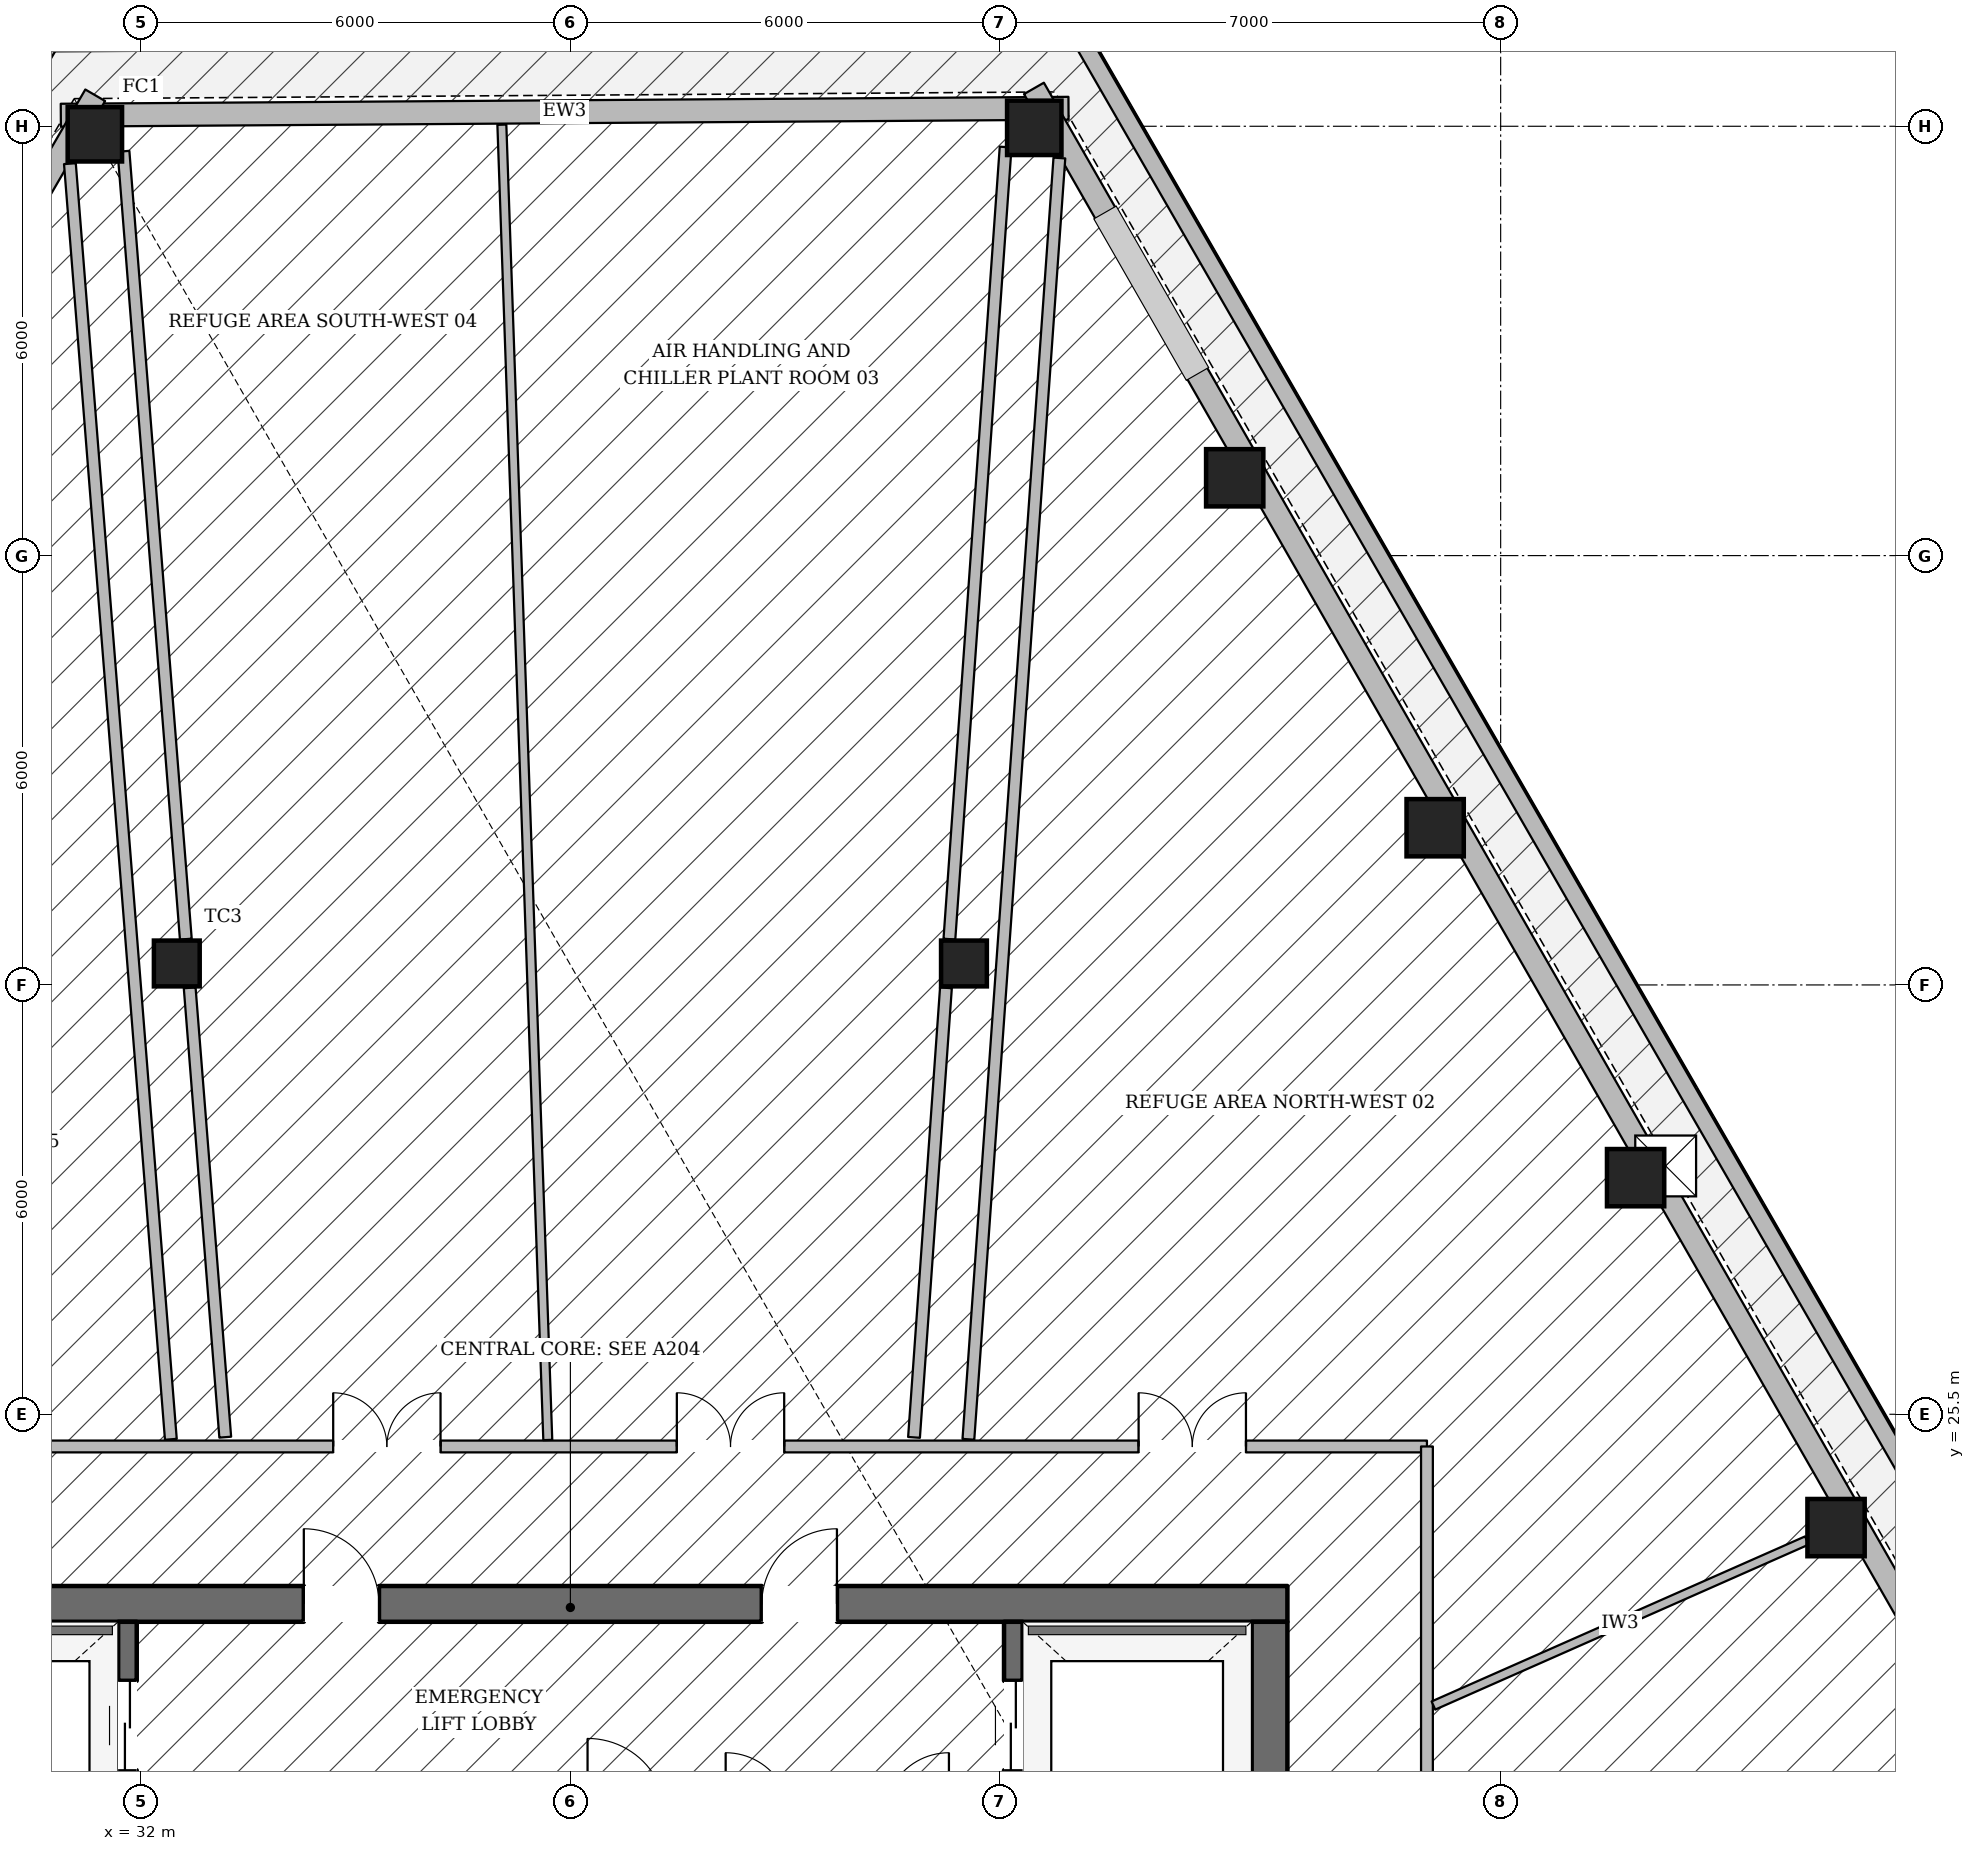
"""IFC4 building model, lengths in metres.
Left out: names, types, materials, properties, quantities, classifications, styles, units other than length and angle.
Written with IfcOpenShell. Run it as: python <this file> out.ifc"""

import sys

from ifc_helpers import new_model, si_unit, direction, frame, frame_2d, origin, origin_2d, place, context, subcontext, project, spatial, rectangle, hollow_rectangle, extrude, element, fill, save


model = new_model("IFC4")
c1 = context("Model", 3, precision=1e-05, world=origin(), true_north=direction((0.0, 1.0)))
c2 = subcontext(c1, "Body", "Model", "MODEL_VIEW")
j1 = project(units=[si_unit("LENGTHUNIT", "METRE"), si_unit("PLANEANGLEUNIT", "RADIAN")], contexts=[c1])
p1 = place(None, origin())
s1 = spatial("IfcSite", under=j1, at=p1, CompositionType="ELEMENT")
p2 = place(p1, origin())
s2 = spatial("IfcBuilding", under=s1, at=p2, CompositionType="ELEMENT")
p3 = place(p2, frame((0.0, 0.0, 75.3)))
s3 = spatial("IfcBuildingStorey", under=s2, at=p3, CompositionType="ELEMENT", Elevation=75.3)
p4 = place(p3, frame((27.98, 22.85, 0.0), z_axis=(0.0, 0.0, 1.0), x_axis=(1.0, 0.0, 0.0)))
e1 = element("IfcWall", 1, at=p4, inside=s3, PredefinedType="SOLIDWALL", context=c2, shape_type="SweptSolid", body=[
    extrude(rectangle(XDim=20.04, YDim=0.5, at=frame_2d((10.02, 0.0))), origin(), (0.0, 0.0, 1.0), 4.985),
])
p5 = place(p4, frame((6.295, 0.0, 0.0)))
e2 = element("IfcOpeningElement", 2, at=p5, cuts=e1, PredefinedType="OPENING", context=c2, shape_type="SweptSolid", body=[
    extrude(rectangle(XDim=1.05, YDim=2.15, at=frame_2d((0.525, 1.075))), frame((0.0, 0.26, 0.0), z_axis=(0.0, -1.0, 0.0), x_axis=(1.0, 0.0, 0.0)), (0.0, 0.0, 1.0), 0.52),
])
p6 = place(p4, frame((12.695, 0.0, 0.0)))
e3 = element("IfcOpeningElement", 3, at=p6, cuts=e1, PredefinedType="OPENING", context=c2, shape_type="SweptSolid", body=[
    extrude(rectangle(XDim=1.05, YDim=2.15, at=frame_2d((0.525, 1.075))), frame((0.0, 0.26, 0.0), z_axis=(0.0, -1.0, 0.0), x_axis=(1.0, 0.0, 0.0)), (0.0, 0.0, 1.0), 0.52),
])
p7 = place(p3, frame((47.77, 9.6, 0.0), z_axis=(0.0, 0.0, 1.0), x_axis=(0.0, 1.0, 0.0)))
e4 = element("IfcWall", 4, at=p7, inside=s3, PredefinedType="SOLIDWALL", context=c2, shape_type="SweptSolid", body=[
    extrude(rectangle(XDim=13.0, YDim=0.5, at=frame_2d((6.5, 0.0))), origin(), (0.0, 0.0, 1.0), 4.985),
])
p8 = place(p7, frame((0.2, 0.0, 0.0)))
e5 = element("IfcOpeningElement", 5, at=p8, cuts=e4, PredefinedType="OPENING", context=c2, shape_type="SweptSolid", body=[
    extrude(rectangle(XDim=1.1, YDim=2.15, at=frame_2d((0.55, 1.075))), frame((0.0, 0.26, 0.0), z_axis=(0.0, -1.0, 0.0), x_axis=(1.0, 0.0, 0.0)), (0.0, 0.0, 1.0), 0.52),
])
p9 = place(p7, frame((8.4, 0.0, 0.0)))
e6 = element("IfcOpeningElement", 6, at=p9, cuts=e4, PredefinedType="OPENING", context=c2, shape_type="SweptSolid", body=[
    extrude(rectangle(XDim=0.9, YDim=2.1, at=frame_2d((0.45, 1.05))), frame((0.0, 0.26, 0.0), z_axis=(0.0, -1.0, 0.0), x_axis=(1.0, 0.0, 0.0)), (0.0, 0.0, 1.0), 0.52),
])
p10 = place(p3, frame((31.81, 9.6, 0.0), z_axis=(0.0, 0.0, 1.0), x_axis=(0.0, 1.0, 0.0)))
e7 = element("IfcWall", 7, at=p10, inside=s3, PredefinedType="SHEAR", context=c2, shape_type="SweptSolid", body=[
    extrude(rectangle(XDim=13.0, YDim=0.26, at=frame_2d((6.5, 0.0))), origin(), (0.0, 0.0, 1.0), 4.985),
])
p11 = place(p10, frame((10.925, 0.0, 0.0)))
e8 = element("IfcOpeningElement", 8, at=p11, cuts=e7, PredefinedType="OPENING", context=c2, shape_type="SweptSolid", body=[
    extrude(rectangle(XDim=1.25, YDim=2.25, at=frame_2d((0.625, 1.125))), frame((0.0, 0.14, 0.0), z_axis=(0.0, -1.0, 0.0), x_axis=(1.0, 0.0, 0.0)), (0.0, 0.0, 1.0), 0.28),
])
p12 = place(p3, frame((44.19, 9.6, 0.0), z_axis=(0.0, 0.0, 1.0), x_axis=(0.0, 1.0, 0.0)))
e9 = element("IfcWall", 9, at=p12, inside=s3, PredefinedType="SHEAR", context=c2, shape_type="SweptSolid", body=[
    extrude(rectangle(XDim=13.0, YDim=0.26, at=frame_2d((6.5, 0.0))), origin(), (0.0, 0.0, 1.0), 4.985),
])
p13 = place(p12, frame((10.925, 0.0, 0.0)))
e10 = element("IfcOpeningElement", 10, at=p13, cuts=e9, PredefinedType="OPENING", context=c2, shape_type="SweptSolid", body=[
    extrude(rectangle(XDim=1.25, YDim=2.25, at=frame_2d((0.625, 1.125))), frame((0.0, 0.14, 0.0), z_axis=(0.0, -1.0, 0.0), x_axis=(1.0, 0.0, 0.0)), (0.0, 0.0, 1.0), 0.28),
])
p14 = place(p3, frame((31.355, 43.388, 0.0), z_axis=(0.0, 0.0, 1.0), x_axis=(1.0, 0.0, 0.0)))
e11 = element("IfcColumn", 11, at=p14, inside=s3, PredefinedType="COLUMN", context=c2, shape_type="SweptSolid", body=[
    extrude(hollow_rectangle(XDim=0.76, YDim=0.76, WallThickness=0.035, at=origin_2d()), origin(), (0.0, 0.0, 1.0), 4.985),
])
for number, where, z_axis, x_axis in (
    (12, (55.687, 23.916, 0.0), (0.0, 0.0, 1.0), (1.0, 0.0, 0.0)),
    (13, (52.886, 28.807, 0.0), (0.0, 0.0, 1.0), (1.0, 0.0, 0.0)),
    (14, (50.085, 33.697, 0.0), (0.0, 0.0, 1.0), (1.0, 0.0, 0.0)),
    (15, (47.284, 38.588, 0.0), (0.0, 0.0, 1.0), (1.0, 0.0, 0.0)),
):
    element("IfcColumn", number, at=place(p3, frame(where, z_axis=z_axis, x_axis=x_axis)), inside=s3, PredefinedType="COLUMN", context=c2, shape_type="SweptSolid", body=[
        extrude(hollow_rectangle(XDim=0.8, YDim=0.8, WallThickness=0.036, at=origin_2d()), origin(), (0.0, 0.0, 1.0), 4.985),
    ])
p15 = place(p3, frame((44.482, 43.478, 0.0), z_axis=(0.0, 0.0, 1.0), x_axis=(1.0, 0.0, 0.0)))
e16 = element("IfcColumn", 16, at=p15, inside=s3, PredefinedType="COLUMN", context=c2, shape_type="SweptSolid", body=[
    extrude(hollow_rectangle(XDim=0.76, YDim=0.76, WallThickness=0.035, at=origin_2d()), origin(), (0.0, 0.0, 1.0), 4.985),
])
for number, where, z_axis, x_axis in (
    (17, (32.5, 31.8, 0.0), (0.0, 0.0, 1.0), (1.0, 0.0, 0.0)),
    (18, (43.5, 31.8, 0.0), (0.0, 0.0, 1.0), (1.0, 0.0, 0.0)),
):
    element("IfcColumn", number, at=place(p3, frame(where, z_axis=z_axis, x_axis=x_axis)), inside=s3, PredefinedType="COLUMN", context=c2, shape_type="SweptSolid", body=[
        extrude(hollow_rectangle(XDim=0.64, YDim=0.64, WallThickness=0.028, at=origin_2d()), origin(), (0.0, 0.0, 1.0), 4.985),
    ])
p16 = place(p3, frame((30.879, 43.655, 0.0), z_axis=(0.0, 0.0, 1.0), x_axis=(0.999976431896, 0.006865540883, 0.0)))
e19 = element("IfcWall", 19, at=p16, inside=s3, PredefinedType="STANDARD", context=c2, shape_type="SweptSolid", body=[
    extrude(rectangle(XDim=14.082, YDim=0.32, at=frame_2d((7.041, 0.0))), origin(), (0.0, 0.0, 1.0), 3.677),
])
p17 = place(p3, frame((13.665, 13.524, 0.0), z_axis=(0.0, 0.0, 1.0), x_axis=(0.50295003743, 0.864315486295, 0.0)))
e20 = element("IfcWall", 20, at=p17, inside=s3, PredefinedType="STANDARD", context=c2, shape_type="SweptSolid", body=[
    extrude(rectangle(XDim=35.184, YDim=0.32, at=frame_2d((17.592, 0.0))), origin(), (0.0, 0.0, 1.0), 3.677),
])
p18 = place(p3, frame((44.478, 44.029, 0.0), z_axis=(0.0, 0.0, 1.0), x_axis=(0.497006709314, -0.867746697428, 0.0)))
e21 = element("IfcWall", 21, at=p18, inside=s3, PredefinedType="STANDARD", context=c2, shape_type="SweptSolid", body=[
    extrude(rectangle(XDim=34.773, YDim=0.32, at=frame_2d((17.386, 0.0))), origin(), (0.0, 0.0, 1.0), 3.677),
])
p19 = place(p3, frame((30.821, 44.822, 0.0), z_axis=(0.0, 0.0, 1.0), x_axis=(-0.504421897802, -0.863457323218, 0.0)))
e22 = element("IfcWall", 22, at=p19, inside=s3, PredefinedType="PARAPET", context=c2, shape_type="SweptSolid", body=[
    extrude(rectangle(XDim=36.395, YDim=0.24, at=frame_2d((18.197, 0.0))), origin(), (0.0, 0.0, 1.0), 1.25),
])
p20 = place(p3, frame((63.012, 13.699, 0.0), z_axis=(0.0, 0.0, 1.0), x_axis=(-0.499261971682, 0.866451085539, 0.0)))
e23 = element("IfcWall", 23, at=p20, inside=s3, PredefinedType="PARAPET", context=c2, shape_type="SweptSolid", body=[
    extrude(rectangle(XDim=36.021, YDim=0.24, at=frame_2d((18.01, 0.0))), origin(), (0.0, 0.0, 1.0), 1.25),
])
p21 = place(p3, frame((26.03, 25.05, 0.0), z_axis=(0.0, 0.0, 1.0), x_axis=(1.0, 0.0, 0.0)))
e24 = element("IfcWall", 24, at=p21, inside=s3, PredefinedType="PARTITIONING", context=c2, shape_type="SweptSolid", body=[
    extrude(rectangle(XDim=23.94, YDim=0.165, at=frame_2d((11.97, 0.0))), origin(), (0.0, 0.0, 1.0), 4.985),
])
p22 = place(p21, frame((19.911, 0.0, 0.0)))
e25 = element("IfcOpeningElement", 25, at=p22, cuts=e24, PredefinedType="OPENING", context=c2, shape_type="SweptSolid", body=[
    extrude(rectangle(XDim=1.5, YDim=2.25, at=frame_2d((0.75, 1.125))), frame((0.0, 0.093, 0.0), z_axis=(0.0, -1.0, 0.0), x_axis=(1.0, 0.0, 0.0)), (0.0, 0.0, 1.0), 0.185),
])
p23 = place(p21, frame((13.458, 0.0, 0.0)))
e26 = element("IfcOpeningElement", 26, at=p23, cuts=e24, PredefinedType="OPENING", context=c2, shape_type="SweptSolid", body=[
    extrude(rectangle(XDim=1.5, YDim=2.25, at=frame_2d((0.75, 1.125))), frame((0.0, 0.093, 0.0), z_axis=(0.0, -1.0, 0.0), x_axis=(1.0, 0.0, 0.0)), (0.0, 0.0, 1.0), 0.185),
])
p24 = place(p21, frame((8.656, 0.0, 0.0)))
e27 = element("IfcOpeningElement", 27, at=p24, cuts=e24, PredefinedType="OPENING", context=c2, shape_type="SweptSolid", body=[
    extrude(rectangle(XDim=1.5, YDim=2.25, at=frame_2d((0.75, 1.125))), frame((0.0, 0.093, 0.0), z_axis=(0.0, -1.0, 0.0), x_axis=(1.0, 0.0, 0.0)), (0.0, 0.0, 1.0), 0.185),
])
p25 = place(p3, frame((49.97, 7.15, 0.0), z_axis=(0.0, 0.0, 1.0), x_axis=(0.0, 1.0, 0.0)))
e28 = element("IfcWall", 28, at=p25, inside=s3, PredefinedType="PARTITIONING", context=c2, shape_type="SweptSolid", body=[
    extrude(rectangle(XDim=17.9, YDim=0.165, at=frame_2d((8.95, 0.0))), origin(), (0.0, 0.0, 1.0), 4.673),
])
p26 = place(p25, frame((8.694, 0.0, 0.0)))
e29 = element("IfcOpeningElement", 29, at=p26, cuts=e28, PredefinedType="OPENING", context=c2, shape_type="SweptSolid", body=[
    extrude(rectangle(XDim=1.5, YDim=2.25, at=frame_2d((0.75, 1.125))), frame((0.0, 0.093, 0.0), z_axis=(0.0, -1.0, 0.0), x_axis=(1.0, 0.0, 0.0)), (0.0, 0.0, 1.0), 0.185),
])
p27 = place(p25, frame((1.235, 0.0, 0.0)))
e30 = element("IfcOpeningElement", 30, at=p27, cuts=e28, PredefinedType="OPENING", context=c2, shape_type="SweptSolid", body=[
    extrude(rectangle(XDim=1.5, YDim=2.25, at=frame_2d((0.75, 1.125))), frame((0.0, 0.093, 0.0), z_axis=(0.0, -1.0, 0.0), x_axis=(1.0, 0.0, 0.0)), (0.0, 0.0, 1.0), 0.185),
])
p28 = place(p3, frame((32.417, 25.15, 0.0), z_axis=(0.0, 0.0, 1.0), x_axis=(-0.078880286834, 0.996884095745, 0.0)))
e31 = element("IfcWall", 31, at=p28, inside=s3, PredefinedType="PARTITIONING", context=c2, shape_type="SweptSolid", body=[
    extrude(rectangle(XDim=17.883, YDim=0.165, at=frame_2d((8.942, 0.0))), origin(), (0.0, 0.0, 1.0), 4.985),
])
p29 = place(p3, frame((33.177, 25.18, 0.0), z_axis=(0.0, 0.0, 1.0), x_axis=(-0.078865664547, 0.996885252652, 0.0)))
e32 = element("IfcWall", 32, at=p29, inside=s3, PredefinedType="PARTITIONING", context=c2, shape_type="SweptSolid", body=[
    extrude(rectangle(XDim=6.3, YDim=0.165, at=frame_2d((3.15, 0.0))), origin(), (0.0, 0.0, 1.0), 4.985),
])
p30 = place(p3, frame((32.626, 32.14, 0.0), z_axis=(0.0, 0.0, 1.0), x_axis=(-0.078892101665, 0.996883160804, 0.0)))
e33 = element("IfcWall", 33, at=p30, inside=s3, PredefinedType="PARTITIONING", context=c2, shape_type="SweptSolid", body=[
    extrude(rectangle(XDim=11.045, YDim=0.165, at=frame_2d((5.522, 0.0))), origin(), (0.0, 0.0, 1.0), 4.985),
])
p31 = place(p3, frame((42.802, 25.177, 0.0), z_axis=(0.0, 0.0, 1.0), x_axis=(0.07085314912, 0.997486757436, 0.0)))
e34 = element("IfcWall", 34, at=p31, inside=s3, PredefinedType="PARTITIONING", context=c2, shape_type="SweptSolid", body=[
    extrude(rectangle(XDim=6.299, YDim=0.165, at=frame_2d((3.149, 0.0))), origin(), (0.0, 0.0, 1.0), 4.985),
])
p32 = place(p3, frame((43.296, 32.14, 0.0), z_axis=(0.0, 0.0, 1.0), x_axis=(0.070840543491, 0.997487652755, 0.0)))
e35 = element("IfcWall", 35, at=p32, inside=s3, PredefinedType="PARTITIONING", context=c2, shape_type="SweptSolid", body=[
    extrude(rectangle(XDim=11.097, YDim=0.165, at=frame_2d((5.549, 0.0))), origin(), (0.0, 0.0, 1.0), 4.985),
])
p33 = place(p3, frame((43.562, 25.15, 0.0), z_axis=(0.0, 0.0, 1.0), x_axis=(0.070828551783, 0.997488504321, 0.0)))
e36 = element("IfcWall", 36, at=p33, inside=s3, PredefinedType="PARTITIONING", context=c2, shape_type="SweptSolid", body=[
    extrude(rectangle(XDim=17.952, YDim=0.165, at=frame_2d((8.976, 0.0))), origin(), (0.0, 0.0, 1.0), 4.985),
])
p34 = place(p3, frame((50.061, 21.43, 0.0), z_axis=(0.0, 0.0, 1.0), x_axis=(0.914660112996, 0.404223796545, 0.0)))
e37 = element("IfcWall", 37, at=p34, inside=s3, PredefinedType="PARTITIONING", context=c2, shape_type="SweptSolid", body=[
    extrude(rectangle(XDim=5.705, YDim=0.125, at=frame_2d((2.853, 0.0))), origin(), (0.0, 0.0, 1.0), 3.68),
])
p35 = place(p3, frame((37.684, 25.14, 0.0), z_axis=(0.0, 0.0, 1.0), x_axis=(-0.034896584606, 0.999390928707, 0.0)))
e38 = element("IfcWall", 38, at=p35, inside=s3, PredefinedType="PARTITIONING", context=c2, shape_type="SweptSolid", body=[
    extrude(rectangle(XDim=18.393, YDim=0.125, at=frame_2d((9.196, 0.0))), origin(), (0.0, 0.0, 1.0), 4.985),
])
p36 = place(p3, frame((0.0, 0.0, -0.22)))
p37 = place(p36, frame((53.306, 28.97, 0.0)))
p38 = place(p37, frame((0.0, 0.0, 0.17)))
e39 = element("IfcWindow", 39, at=p38, inside=s3, PartitioningType="SINGLE_PANEL", PredefinedType="SKYLIGHT", context=c2, shape_type="SweptSolid", body=[
    extrude(rectangle(XDim=0.85, YDim=0.85, at=origin_2d()), origin(), (0.0, 0.0, 1.0), 0.05),
])
p39 = place(p5, origin())
e40 = element("IfcDoor", 40, at=p39, inside=s3, OperationType="SINGLE_SWING_LEFT", PredefinedType="DOOR", context=c2, shape_type="SweptSolid", body=[
    extrude(rectangle(XDim=1.05, YDim=2.15, at=frame_2d((0.525, 1.075))), frame((0.0, 0.025, 0.0), z_axis=(0.0, -1.0, 0.0), x_axis=(1.0, 0.0, 0.0)), (0.0, 0.0, 1.0), 0.05),
])
fill(e2, e40)
p40 = place(p6, origin())
e41 = element("IfcDoor", 41, at=p40, inside=s3, OperationType="SINGLE_SWING_RIGHT", PredefinedType="DOOR", context=c2, shape_type="SweptSolid", body=[
    extrude(rectangle(XDim=1.05, YDim=2.15, at=frame_2d((0.525, 1.075))), frame((0.0, 0.025, 0.0), z_axis=(0.0, -1.0, 0.0), x_axis=(1.0, 0.0, 0.0)), (0.0, 0.0, 1.0), 0.05),
])
fill(e3, e41)
p41 = place(p11, origin())
e42 = element("IfcDoor", 42, at=p41, inside=s3, OperationType="DOUBLE_DOOR_SLIDING", PredefinedType="DOOR", context=c2, shape_type="SweptSolid", body=[
    extrude(rectangle(XDim=1.25, YDim=2.25, at=frame_2d((0.625, 1.125))), frame((0.0, 0.025, 0.0), z_axis=(0.0, -1.0, 0.0), x_axis=(1.0, 0.0, 0.0)), (0.0, 0.0, 1.0), 0.05),
])
fill(e8, e42)
p42 = place(p13, origin())
e43 = element("IfcDoor", 43, at=p42, inside=s3, OperationType="DOUBLE_DOOR_SLIDING", PredefinedType="DOOR", context=c2, shape_type="SweptSolid", body=[
    extrude(rectangle(XDim=1.25, YDim=2.25, at=frame_2d((0.625, 1.125))), frame((0.0, 0.025, 0.0), z_axis=(0.0, -1.0, 0.0), x_axis=(1.0, 0.0, 0.0)), (0.0, 0.0, 1.0), 0.05),
])
fill(e10, e43)
p43 = place(p22, origin())
e44 = element("IfcDoor", 44, at=p43, inside=s3, OperationType="DOUBLE_DOOR_SINGLE_SWING", PredefinedType="DOOR", context=c2, shape_type="SweptSolid", body=[
    extrude(rectangle(XDim=1.5, YDim=2.25, at=frame_2d((0.75, 1.125))), frame((0.0, 0.025, 0.0), z_axis=(0.0, -1.0, 0.0), x_axis=(1.0, 0.0, 0.0)), (0.0, 0.0, 1.0), 0.05),
])
fill(e25, e44)
p44 = place(p23, origin())
e45 = element("IfcDoor", 45, at=p44, inside=s3, OperationType="DOUBLE_DOOR_SINGLE_SWING", PredefinedType="DOOR", context=c2, shape_type="SweptSolid", body=[
    extrude(rectangle(XDim=1.5, YDim=2.25, at=frame_2d((0.75, 1.125))), frame((0.0, 0.025, 0.0), z_axis=(0.0, -1.0, 0.0), x_axis=(1.0, 0.0, 0.0)), (0.0, 0.0, 1.0), 0.05),
])
fill(e26, e45)
p45 = place(p24, origin())
e46 = element("IfcDoor", 46, at=p45, inside=s3, OperationType="DOUBLE_DOOR_SINGLE_SWING", PredefinedType="DOOR", context=c2, shape_type="SweptSolid", body=[
    extrude(rectangle(XDim=1.5, YDim=2.25, at=frame_2d((0.75, 1.125))), frame((0.0, 0.025, 0.0), z_axis=(0.0, -1.0, 0.0), x_axis=(1.0, 0.0, 0.0)), (0.0, 0.0, 1.0), 0.05),
])
fill(e27, e46)
save(model, sys.argv[1])
